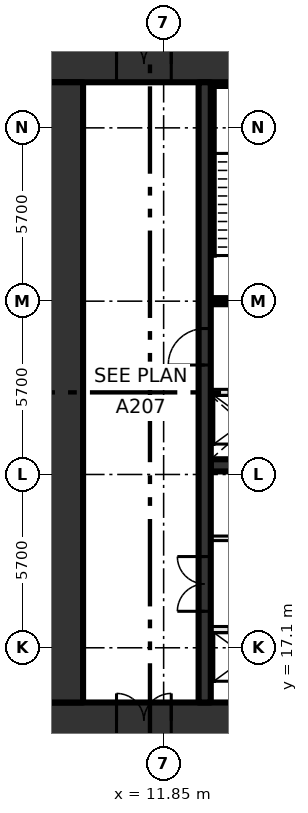
"""IFC4 building model, lengths in metres.
Left out: names, types, materials, properties, quantities, classifications, styles, units other than length and angle.
Written with IfcOpenShell. Run it as: python <this file> out.ifc"""

import sys

from ifc_helpers import new_model, si_unit, direction, frame, frame_2d, origin, place, context, subcontext, project, spatial, rectangle, extrude, element, fill, save


model = new_model("IFC4")
c1 = context("Model", 3, precision=1e-05, world=origin(), true_north=direction((0.0, 1.0)))
c2 = subcontext(c1, "Body", "Model", "MODEL_VIEW")
j1 = project(units=[si_unit("LENGTHUNIT", "METRE"), si_unit("PLANEANGLEUNIT", "RADIAN")], contexts=[c1])
p1 = place(None, origin())
s1 = spatial("IfcSite", under=j1, at=p1, CompositionType="ELEMENT")
p2 = place(p1, origin())
s2 = spatial("IfcBuilding", under=s1, at=p2, CompositionType="ELEMENT")
p3 = place(p2, frame((0.0, 0.0, 23.4)))
s3 = spatial("IfcBuildingStorey", under=s2, at=p3, CompositionType="ELEMENT", Elevation=23.4)
p4 = place(p3, frame((8.0, 14.7, -0.45), z_axis=(0.0, 0.0, 1.0), x_axis=(1.0, 0.0, 0.0)))
e1 = element("IfcWall", 1, at=p4, inside=s3, PredefinedType="SHEAR", context=c2, shape_type="SweptSolid", body=[
    extrude(rectangle(XDim=22.8, YDim=1.2, at=frame_2d((11.4, 0.0))), origin(), (0.0, 0.0, 1.0), 4.8),
])
p5 = place(p4, frame((2.3, 0.0, 0.45)))
e2 = element("IfcOpeningElement", 2, at=p5, cuts=e1, PredefinedType="OPENING", context=c2, shape_type="SweptSolid", body=[
    extrude(rectangle(XDim=1.8, YDim=2.1, at=frame_2d((0.9, 1.05))), frame((0.0, 0.61, 0.0), z_axis=(0.0, -1.0, 0.0), x_axis=(1.0, 0.0, 0.0)), (0.0, 0.0, 1.0), 1.22),
])
p6 = place(p3, frame((8.0, 36.3, -0.45), z_axis=(0.0, 0.0, 1.0), x_axis=(1.0, 0.0, 0.0)))
e3 = element("IfcWall", 3, at=p6, inside=s3, PredefinedType="SHEAR", context=c2, shape_type="SweptSolid", body=[
    extrude(rectangle(XDim=22.8, YDim=1.2, at=frame_2d((11.4, 0.0))), origin(), (0.0, 0.0, 1.0), 4.8),
])
p7 = place(p6, frame((2.3, 0.0, 0.45)))
e4 = element("IfcOpeningElement", 4, at=p7, cuts=e3, PredefinedType="OPENING", context=c2, shape_type="SweptSolid", body=[
    extrude(rectangle(XDim=1.8, YDim=2.1, at=frame_2d((0.9, 1.05))), frame((0.0, 0.61, 0.0), z_axis=(0.0, -1.0, 0.0), x_axis=(1.0, 0.0, 0.0)), (0.0, 0.0, 1.0), 1.22),
])
p8 = place(p3, frame((8.6, 15.3, -0.45), z_axis=(0.0, 0.0, 1.0), x_axis=(0.0, 1.0, 0.0)))
e5 = element("IfcWall", 5, at=p8, inside=s3, PredefinedType="SHEAR", context=c2, shape_type="SweptSolid", body=[
    extrude(rectangle(XDim=20.4, YDim=1.2, at=frame_2d((10.2, 0.0))), origin(), (0.0, 0.0, 1.0), 4.8),
])
p9 = place(p3, frame((13.4, 17.7, 0.0), z_axis=(0.0, 0.0, 1.0), x_axis=(1.0, 0.0, 0.0)))
e6 = element("IfcWall", 6, at=p9, inside=s3, PredefinedType="SOLIDWALL", context=c2, shape_type="SweptSolid", body=[
    extrude(rectangle(XDim=13.4, YDim=0.2, at=frame_2d((6.7, 0.0))), origin(), (0.0, 0.0, 1.0), 4.35),
])
p10 = place(p9, frame((0.6, 0.0, 0.0)))
e7 = element("IfcOpeningElement", 7, at=p10, cuts=e6, PredefinedType="OPENING", context=c2, shape_type="SweptSolid", body=[
    extrude(rectangle(XDim=1.1, YDim=2.1, at=frame_2d((0.55, 1.05))), frame((0.0, 0.11, 0.0), z_axis=(0.0, -1.0, 0.0), x_axis=(1.0, 0.0, 0.0)), (0.0, 0.0, 1.0), 0.22),
])
p11 = place(p9, frame((3.3, 0.0, 0.0)))
e8 = element("IfcOpeningElement", 8, at=p11, cuts=e6, PredefinedType="OPENING", context=c2, shape_type="SweptSolid", body=[
    extrude(rectangle(XDim=1.1, YDim=2.1, at=frame_2d((0.55, 1.05))), frame((0.0, 0.11, 0.0), z_axis=(0.0, -1.0, 0.0), x_axis=(1.0, 0.0, 0.0)), (0.0, 0.0, 1.0), 0.22),
])
p12 = place(p9, frame((6.0, 0.0, 0.0)))
e9 = element("IfcOpeningElement", 9, at=p12, cuts=e6, PredefinedType="OPENING", context=c2, shape_type="SweptSolid", body=[
    extrude(rectangle(XDim=1.1, YDim=2.1, at=frame_2d((0.55, 1.05))), frame((0.0, 0.11, 0.0), z_axis=(0.0, -1.0, 0.0), x_axis=(1.0, 0.0, 0.0)), (0.0, 0.0, 1.0), 0.22),
])
p13 = place(p9, frame((8.7, 0.0, 0.0)))
e10 = element("IfcOpeningElement", 10, at=p13, cuts=e6, PredefinedType="OPENING", context=c2, shape_type="SweptSolid", body=[
    extrude(rectangle(XDim=1.1, YDim=2.1, at=frame_2d((0.55, 1.05))), frame((0.0, 0.11, 0.0), z_axis=(0.0, -1.0, 0.0), x_axis=(1.0, 0.0, 0.0)), (0.0, 0.0, 1.0), 0.22),
])
p14 = place(p9, frame((11.4, 0.0, 0.0)))
e11 = element("IfcOpeningElement", 11, at=p14, cuts=e6, PredefinedType="OPENING", context=c2, shape_type="SweptSolid", body=[
    extrude(rectangle(XDim=1.1, YDim=2.1, at=frame_2d((0.55, 1.05))), frame((0.0, 0.11, 0.0), z_axis=(0.0, -1.0, 0.0), x_axis=(1.0, 0.0, 0.0)), (0.0, 0.0, 1.0), 0.22),
])
p15 = place(p3, frame((13.4, 20.7, 0.0), z_axis=(0.0, 0.0, 1.0), x_axis=(1.0, 0.0, 0.0)))
e12 = element("IfcWall", 12, at=p15, inside=s3, PredefinedType="PARTITIONING", context=c2, shape_type="SweptSolid", body=[
    extrude(rectangle(XDim=13.4, YDim=0.15, at=frame_2d((6.7, 0.0))), origin(), (0.0, 0.0, 1.0), 4.35),
])
p16 = place(p15, frame((6.1, 0.0, 0.0)))
e13 = element("IfcOpeningElement", 13, at=p16, cuts=e12, PredefinedType="OPENING", context=c2, shape_type="SweptSolid", body=[
    extrude(rectangle(XDim=0.9, YDim=2.1, at=frame_2d((0.45, 1.05))), frame((0.0, 0.085, 0.0), z_axis=(0.0, -1.0, 0.0), x_axis=(1.0, 0.0, 0.0)), (0.0, 0.0, 1.0), 0.17),
])
p17 = place(p3, frame((13.4, 23.1, 0.0), z_axis=(0.0, 0.0, 1.0), x_axis=(1.0, 0.0, 0.0)))
e14 = element("IfcWall", 14, at=p17, inside=s3, PredefinedType="SHEAR", context=c2, shape_type="SweptSolid", body=[
    extrude(rectangle(XDim=16.2, YDim=0.4, at=frame_2d((8.1, 0.0))), origin(), (0.0, 0.0, 1.0), 4.35),
])
p18 = place(p3, frame((13.4, 25.5, 0.0), z_axis=(0.0, 0.0, 1.0), x_axis=(1.0, 0.0, 0.0)))
e15 = element("IfcWall", 15, at=p18, inside=s3, PredefinedType="SOLIDWALL", context=c2, shape_type="SweptSolid", body=[
    extrude(rectangle(XDim=16.2, YDim=0.2, at=frame_2d((8.1, 0.0))), origin(), (0.0, 0.0, 1.0), 4.35),
])
p19 = place(p18, frame((0.6, 0.0, 0.0)))
e16 = element("IfcOpeningElement", 16, at=p19, cuts=e15, PredefinedType="OPENING", context=c2, shape_type="SweptSolid", body=[
    extrude(rectangle(XDim=1.1, YDim=2.1, at=frame_2d((0.55, 1.05))), frame((0.0, 0.11, 0.0), z_axis=(0.0, -1.0, 0.0), x_axis=(1.0, 0.0, 0.0)), (0.0, 0.0, 1.0), 0.22),
])
p20 = place(p18, frame((3.3, 0.0, 0.0)))
e17 = element("IfcOpeningElement", 17, at=p20, cuts=e15, PredefinedType="OPENING", context=c2, shape_type="SweptSolid", body=[
    extrude(rectangle(XDim=1.1, YDim=2.1, at=frame_2d((0.55, 1.05))), frame((0.0, 0.11, 0.0), z_axis=(0.0, -1.0, 0.0), x_axis=(1.0, 0.0, 0.0)), (0.0, 0.0, 1.0), 0.22),
])
p21 = place(p18, frame((6.0, 0.0, 0.0)))
e18 = element("IfcOpeningElement", 18, at=p21, cuts=e15, PredefinedType="OPENING", context=c2, shape_type="SweptSolid", body=[
    extrude(rectangle(XDim=1.1, YDim=2.1, at=frame_2d((0.55, 1.05))), frame((0.0, 0.11, 0.0), z_axis=(0.0, -1.0, 0.0), x_axis=(1.0, 0.0, 0.0)), (0.0, 0.0, 1.0), 0.22),
])
p22 = place(p18, frame((8.7, 0.0, 0.0)))
e19 = element("IfcOpeningElement", 19, at=p22, cuts=e15, PredefinedType="OPENING", context=c2, shape_type="SweptSolid", body=[
    extrude(rectangle(XDim=1.1, YDim=2.1, at=frame_2d((0.55, 1.05))), frame((0.0, 0.11, 0.0), z_axis=(0.0, -1.0, 0.0), x_axis=(1.0, 0.0, 0.0)), (0.0, 0.0, 1.0), 0.22),
])
p23 = place(p3, frame((13.4, 28.5, 0.0), z_axis=(0.0, 0.0, 1.0), x_axis=(1.0, 0.0, 0.0)))
e20 = element("IfcWall", 20, at=p23, inside=s3, PredefinedType="SOLIDWALL", context=c2, shape_type="SweptSolid", body=[
    extrude(rectangle(XDim=6.7, YDim=0.2, at=frame_2d((3.35, 0.0))), origin(), (0.0, 0.0, 1.0), 4.35),
])
p24 = place(p23, frame((0.9, 0.0, 0.0)))
e21 = element("IfcOpeningElement", 21, at=p24, cuts=e20, PredefinedType="OPENING", context=c2, shape_type="SweptSolid", body=[
    extrude(rectangle(XDim=1.2, YDim=2.1, at=frame_2d((0.6, 1.05))), frame((0.0, 0.11, 0.0), z_axis=(0.0, -1.0, 0.0), x_axis=(1.0, 0.0, 0.0)), (0.0, 0.0, 1.0), 0.22),
])
p25 = place(p23, frame((3.7, 0.0, 0.0)))
e22 = element("IfcOpeningElement", 22, at=p25, cuts=e20, PredefinedType="OPENING", context=c2, shape_type="SweptSolid", body=[
    extrude(rectangle(XDim=1.1, YDim=2.1, at=frame_2d((0.55, 1.05))), frame((0.0, 0.11, 0.0), z_axis=(0.0, -1.0, 0.0), x_axis=(1.0, 0.0, 0.0)), (0.0, 0.0, 1.0), 0.22),
])
p26 = place(p3, frame((13.2, 15.3, 0.0), z_axis=(0.0, 0.0, 1.0), x_axis=(0.0, 1.0, 0.0)))
e23 = element("IfcWall", 23, at=p26, inside=s3, PredefinedType="SHEAR", context=c2, shape_type="SweptSolid", body=[
    extrude(rectangle(XDim=20.4, YDim=0.4, at=frame_2d((10.2, 0.0))), origin(), (0.0, 0.0, 1.0), 4.35),
])
p27 = place(p26, frame((3.0, 0.0, 0.0)))
e24 = element("IfcOpeningElement", 24, at=p27, cuts=e23, PredefinedType="OPENING", context=c2, shape_type="SweptSolid", body=[
    extrude(rectangle(XDim=1.8, YDim=2.1, at=frame_2d((0.9, 1.05))), frame((0.0, 0.21, 0.0), z_axis=(0.0, -1.0, 0.0), x_axis=(1.0, 0.0, 0.0)), (0.0, 0.0, 1.0), 0.42),
])
p28 = place(p26, frame((11.1, 0.0, 0.0)))
e25 = element("IfcOpeningElement", 25, at=p28, cuts=e23, PredefinedType="OPENING", context=c2, shape_type="SweptSolid", body=[
    extrude(rectangle(XDim=1.2, YDim=2.1, at=frame_2d((0.6, 1.05))), frame((0.0, 0.21, 0.0), z_axis=(0.0, -1.0, 0.0), x_axis=(1.0, 0.0, 0.0)), (0.0, 0.0, 1.0), 0.42),
])
p29 = place(p27, origin())
e26 = element("IfcDoor", 26, at=p29, inside=s3, OperationType="DOUBLE_DOOR_SINGLE_SWING", PredefinedType="DOOR", context=c2, shape_type="SweptSolid", body=[
    extrude(rectangle(XDim=1.8, YDim=2.1, at=frame_2d((0.9, 1.05))), frame((0.0, 0.025, 0.0), z_axis=(0.0, -1.0, 0.0), x_axis=(1.0, 0.0, 0.0)), (0.0, 0.0, 1.0), 0.05),
])
fill(e24, e26)
p30 = place(p28, origin())
e27 = element("IfcDoor", 27, at=p30, inside=s3, OperationType="SINGLE_SWING_LEFT", PredefinedType="DOOR", context=c2, shape_type="SweptSolid", body=[
    extrude(rectangle(XDim=1.2, YDim=2.1, at=frame_2d((0.6, 1.05))), frame((0.0, 0.025, 0.0), z_axis=(0.0, -1.0, 0.0), x_axis=(1.0, 0.0, 0.0)), (0.0, 0.0, 1.0), 0.05),
])
fill(e25, e27)
p31 = place(p7, origin())
e28 = element("IfcDoor", 28, at=p31, inside=s3, OperationType="DOUBLE_DOOR_SINGLE_SWING", PredefinedType="DOOR", context=c2, shape_type="SweptSolid", body=[
    extrude(rectangle(XDim=1.8, YDim=2.1, at=frame_2d((0.9, 1.05))), frame((0.0, 0.025, 0.0), z_axis=(0.0, -1.0, 0.0), x_axis=(1.0, 0.0, 0.0)), (0.0, 0.0, 1.0), 0.05),
])
fill(e4, e28)
p32 = place(p5, origin())
e29 = element("IfcDoor", 29, at=p32, inside=s3, OperationType="DOUBLE_DOOR_SINGLE_SWING", PredefinedType="DOOR", context=c2, shape_type="SweptSolid", body=[
    extrude(rectangle(XDim=1.8, YDim=2.1, at=frame_2d((0.9, 1.05))), frame((0.0, 0.025, 0.0), z_axis=(0.0, -1.0, 0.0), x_axis=(1.0, 0.0, 0.0)), (0.0, 0.0, 1.0), 0.05),
])
fill(e2, e29)
save(model, sys.argv[1])
